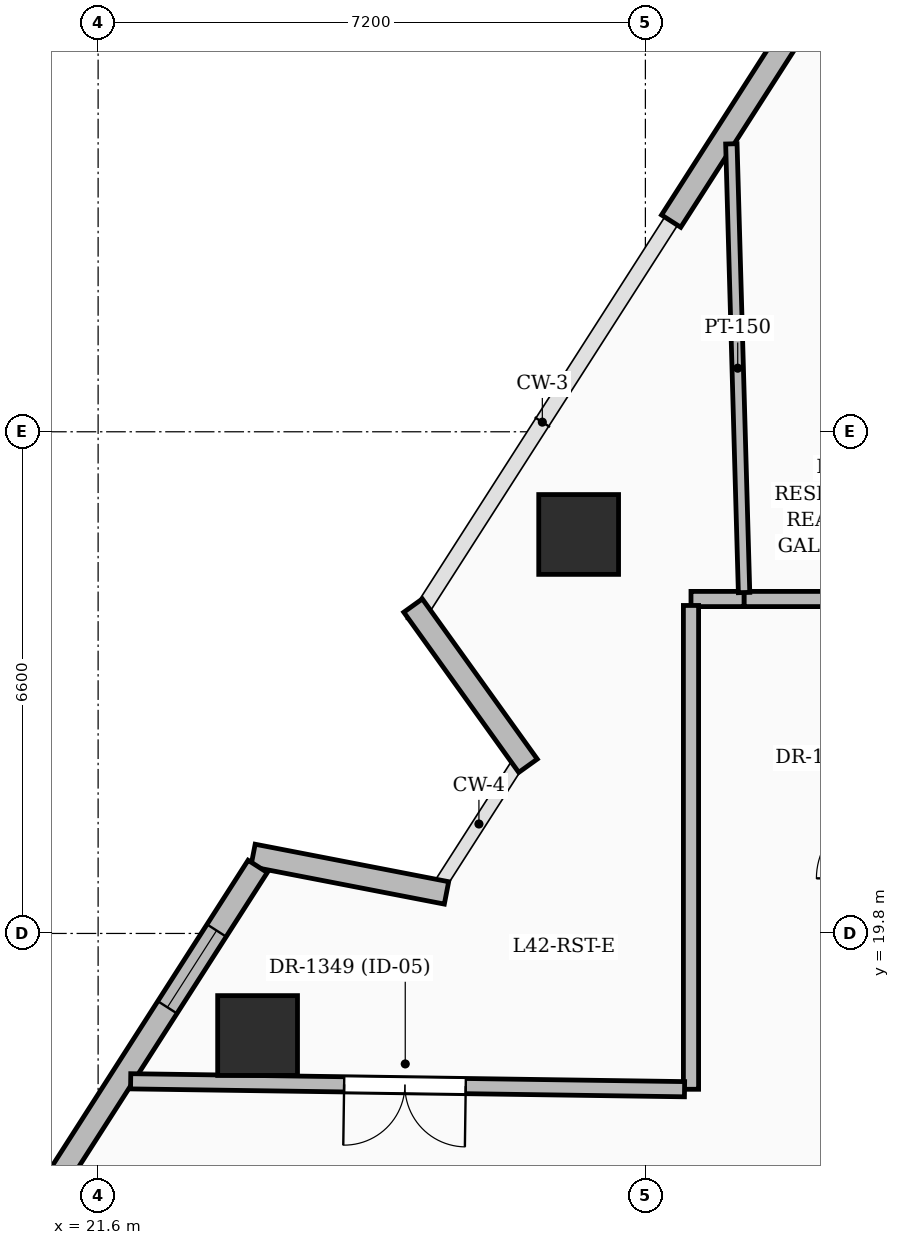
"""IFC4 building model, lengths in metres.
Left out: names, types, materials, properties, quantities, classifications, styles, units other than length and angle.
Written with IfcOpenShell. Run it as: python <this file> out.ifc"""

import sys

from ifc_helpers import new_model, si_unit, direction, frame, frame_2d, origin, origin_2d, place, context, subcontext, project, spatial, rectangle, extrude, element, fill, save


model = new_model("IFC4")
c1 = context("Model", 3, precision=1e-05, world=origin(), true_north=direction((0.0, 1.0)))
c2 = subcontext(c1, "Body", "Model", "MODEL_VIEW")
j1 = project(units=[si_unit("LENGTHUNIT", "METRE"), si_unit("PLANEANGLEUNIT", "RADIAN")], contexts=[c1])
p1 = place(None, origin())
s1 = spatial("IfcSite", under=j1, at=p1, CompositionType="ELEMENT")
p2 = place(p1, origin())
s2 = spatial("IfcBuilding", under=s1, at=p2, CompositionType="ELEMENT")
p3 = place(p2, frame((0.0, 0.0, 164.4)))
s3 = spatial("IfcBuildingStorey", under=s2, at=p3, CompositionType="ELEMENT", Elevation=164.4)
for number, where, z_axis, x_axis in (
    (1, (27.922, 25.049, 0.0), (0.0, 0.0, 1.0), (1.0, 0.0, 0.0)),
    (2, (23.698, 18.457, 0.0), (0.0, 0.0, 1.0), (1.0, 0.0, 0.0)),
):
    element("IfcColumn", number, at=place(p3, frame(where, z_axis=z_axis, x_axis=x_axis)), inside=s3, PredefinedType="COLUMN", context=c2, shape_type="SweptSolid", body=[
        extrude(rectangle(XDim=1.05, YDim=1.05, at=origin_2d()), origin(), (0.0, 0.0, 1.0), 3.6),
    ])
p4 = place(p3, frame((23.638, 20.827, 0.0), z_axis=(0.0, 0.0, 1.0), x_axis=(0.981746971615, -0.190191702567, 0.0)))
e3 = element("IfcWall", 3, at=p4, inside=s3, PredefinedType="SOLIDWALL", context=c2, shape_type="SweptSolid", body=[
    extrude(rectangle(XDim=2.593, YDim=0.3, at=frame_2d((1.296, 0.0))), origin(), (0.0, 0.0, 1.0), 2.575),
])
p5 = place(p3, frame((27.256, 22.006, 0.0), z_axis=(0.0, 0.0, 1.0), x_axis=(-0.58299973372, 0.812472344442, 0.0)))
e4 = element("IfcWall", 4, at=p5, inside=s3, PredefinedType="SOLIDWALL", context=c2, shape_type="SweptSolid", body=[
    extrude(rectangle(XDim=2.594, YDim=0.3, at=frame_2d((1.297, 0.0))), origin(), (0.0, 0.0, 1.0), 2.575),
])
p6 = place(p3, frame((29.139, 29.171, 0.0), z_axis=(0.0, 0.0, 1.0), x_axis=(0.539533329528, 0.841964242904, 0.0)))
e5 = element("IfcWall", 5, at=p6, inside=s3, PredefinedType="SOLIDWALL", context=c2, shape_type="SweptSolid", body=[
    extrude(rectangle(XDim=6.282, YDim=0.3, at=frame_2d((3.141, 0.0))), origin(), (0.0, 0.0, 1.0), 3.35),
])
p7 = place(p3, frame((20.461, 15.629, 0.0), z_axis=(0.0, 0.0, 1.0), x_axis=(0.539533786056, 0.841963950359, 0.0)))
e6 = element("IfcWall", 6, at=p7, inside=s3, PredefinedType="SOLIDWALL", context=c2, shape_type="SweptSolid", body=[
    extrude(rectangle(XDim=6.002, YDim=0.3, at=frame_2d((3.001, 0.0))), origin(), (0.0, 0.0, 1.0), 3.35),
])
p8 = place(p7, frame((3.8, 0.0, 0.8)))
e7 = element("IfcOpeningElement", 7, at=p8, cuts=e6, PredefinedType="OPENING", context=c2, shape_type="SweptSolid", body=[
    extrude(rectangle(XDim=1.2, YDim=1.8, at=frame_2d((0.6, 0.9))), frame((0.0, 0.16, 0.0), z_axis=(0.0, -1.0, 0.0), x_axis=(1.0, 0.0, 0.0)), (0.0, 0.0, 1.0), 0.32),
])
p9 = place(p3, frame((30.1, 24.2, 0.0), z_axis=(0.0, 0.0, 1.0), x_axis=(-1.0, 0.0, 0.0)))
e8 = element("IfcWall", 8, at=p9, inside=s3, PredefinedType="PARTITIONING", context=c2, shape_type="SweptSolid", body=[
    extrude(rectangle(XDim=0.7, YDim=0.2, at=frame_2d((0.35, 0.0))), origin(), (0.0, 0.0, 1.0), 2.712),
])
p10 = place(p3, frame((29.4, 24.115, 0.0), z_axis=(0.0, 0.0, 1.0), x_axis=(0.0, -1.0, 0.0)))
e9 = element("IfcWall", 9, at=p10, inside=s3, PredefinedType="PARTITIONING", context=c2, shape_type="SweptSolid", body=[
    extrude(rectangle(XDim=6.365, YDim=0.2, at=frame_2d((3.183, 0.0))), origin(), (0.0, 0.0, 1.0), 2.393),
])
p11 = place(p3, frame((29.315, 17.751, 0.0), z_axis=(0.0, 0.0, 1.0), x_axis=(-0.999898159275, 0.014271337684, 0.0)))
e10 = element("IfcWall", 10, at=p11, inside=s3, PredefinedType="PARTITIONING", context=c2, shape_type="SweptSolid", body=[
    extrude(rectangle(XDim=7.288, YDim=0.2, at=frame_2d((3.644, 0.0))), origin(), (0.0, 0.0, 1.0), 2.393),
])
p12 = place(p11, frame((2.879, 0.0, 0.0)))
e11 = element("IfcOpeningElement", 11, at=p12, cuts=e10, PredefinedType="OPENING", context=c2, shape_type="SweptSolid", body=[
    extrude(rectangle(XDim=1.6, YDim=2.3, at=frame_2d((0.8, 1.15))), frame((0.0, 0.11, 0.0), z_axis=(0.0, -1.0, 0.0), x_axis=(1.0, 0.0, 0.0)), (0.0, 0.0, 1.0), 0.22),
])
p13 = place(p3, frame((31.865, 24.2, 0.0), z_axis=(0.0, 0.0, 1.0), x_axis=(-1.0, 0.0, 0.0)))
e12 = element("IfcWall", 12, at=p13, inside=s3, PredefinedType="PARTITIONING", context=c2, shape_type="SweptSolid", body=[
    extrude(rectangle(XDim=1.765, YDim=0.2, at=frame_2d((0.882, 0.0))), origin(), (0.0, 0.0, 1.0), 2.712),
])
p14 = place(p3, frame((30.098, 24.285, 0.0), z_axis=(0.0, 0.0, 1.0), x_axis=(-0.02836031544, 0.999597765358, 0.0)))
e13 = element("IfcWall", 13, at=p14, inside=s3, PredefinedType="PARTITIONING", context=c2, shape_type="SweptSolid", body=[
    extrude(rectangle(XDim=5.906, YDim=0.15, at=frame_2d((2.953, 0.0))), origin(), (0.0, 0.0, 1.0), 2.57),
])
p15 = place(p8, origin())
e14 = element("IfcWindow", 14, at=p15, inside=s3, PartitioningType="SINGLE_PANEL", PredefinedType="WINDOW", context=c2, shape_type="SweptSolid", body=[
    extrude(rectangle(XDim=1.2, YDim=1.8, at=frame_2d((0.6, 0.9))), frame((0.0, 0.03, 0.0), z_axis=(0.0, -1.0, 0.0), x_axis=(1.0, 0.0, 0.0)), (0.0, 0.0, 1.0), 0.06),
])
fill(e7, e14)
p16 = place(p12, origin())
e15 = element("IfcDoor", 15, at=p16, inside=s3, OperationType="DOUBLE_DOOR_SINGLE_SWING", PredefinedType="DOOR", context=c2, shape_type="SweptSolid", body=[
    extrude(rectangle(XDim=1.6, YDim=2.3, at=frame_2d((0.8, 1.15))), frame((0.0, 0.025, 0.0), z_axis=(0.0, -1.0, 0.0), x_axis=(1.0, 0.0, 0.0)), (0.0, 0.0, 1.0), 0.05),
])
fill(e11, e15)
save(model, sys.argv[1])
